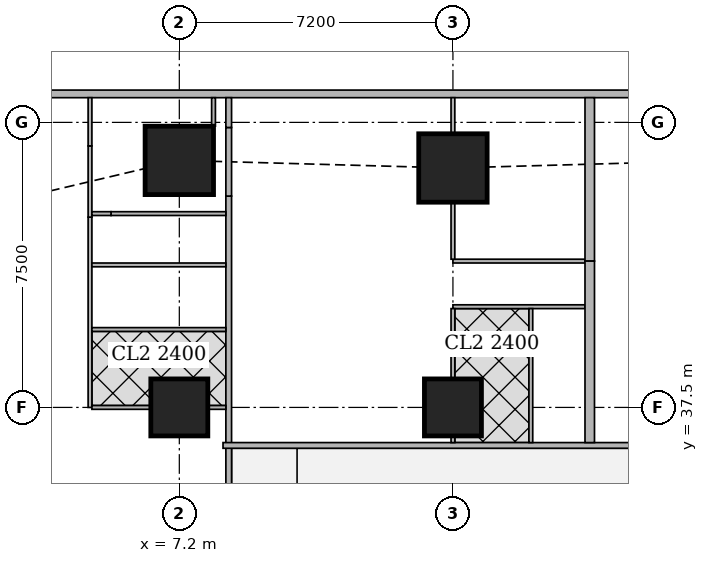
"""IFC4 building model, lengths in metres.
Left out: names, types, materials, properties, quantities, classifications, styles, units other than length and angle.
Written with IfcOpenShell. Run it as: python <this file> out.ifc"""

import sys

from ifc_helpers import new_model, si_unit, direction, frame, frame_2d, origin, origin_2d, place, context, subcontext, project, spatial, rectangle, extrude, element, fill, save


model = new_model("IFC4")
c1 = context("Model", 3, precision=1e-05, world=origin(), true_north=direction((0.0, 1.0)))
c2 = subcontext(c1, "Body", "Model", "MODEL_VIEW")
j1 = project(units=[si_unit("LENGTHUNIT", "METRE"), si_unit("PLANEANGLEUNIT", "RADIAN")], contexts=[c1])
p1 = place(None, origin())
s1 = spatial("IfcSite", under=j1, at=p1, CompositionType="ELEMENT")
p2 = place(p1, origin())
s2 = spatial("IfcBuilding", under=s1, at=p2, CompositionType="ELEMENT")
p3 = place(p2, frame((0.0, 0.0, 139.55)))
s3 = spatial("IfcBuildingStorey", under=s2, at=p3, CompositionType="ELEMENT", Elevation=139.55)
for number, where, z_axis, x_axis in (
    (1, (7.2, 37.5, 0.0), (0.0, 0.0, 1.0), (1.0, 0.0, 0.0)),
    (2, (14.4, 37.5, 0.0), (0.0, 0.0, 1.0), (1.0, 0.0, 0.0)),
):
    element("IfcColumn", number, at=place(p3, frame(where, z_axis=z_axis, x_axis=x_axis)), inside=s3, PredefinedType="COLUMN", context=c2, shape_type="SweptSolid", body=[
        extrude(rectangle(XDim=1.5, YDim=1.5, at=origin_2d()), origin(), (0.0, 0.0, 1.0), 3.75),
    ])
for number, where, z_axis, x_axis in (
    (3, (7.2, 44.0, 0.0), (0.0, 0.0, 1.0), (1.0, 0.0, 0.0)),
    (4, (14.4, 43.8, 0.0), (0.0, 0.0, 1.0), (1.0, 0.0, 0.0)),
):
    element("IfcColumn", number, at=place(p3, frame(where, z_axis=z_axis, x_axis=x_axis)), inside=s3, PredefinedType="COLUMN", context=c2, shape_type="SweptSolid", body=[
        extrude(rectangle(XDim=1.8, YDim=1.8, at=origin_2d()), origin(), (0.0, 0.0, 1.0), 3.75),
    ])
p4 = place(p3, frame((40.106, 45.75, 0.0), z_axis=(0.0, 0.0, 1.0), x_axis=(-1.0, 0.0, 0.0)))
e5 = element("IfcWall", 5, at=p4, inside=s3, PredefinedType="SOLIDWALL", context=c2, shape_type="SweptSolid", body=[
    extrude(rectangle(XDim=37.943, YDim=0.2, at=frame_2d((18.971, 0.0))), origin(), (0.0, 0.0, 1.0), 3.5),
])
p5 = place(p4, frame((8.606, 0.0, 0.9)))
e6 = element("IfcOpeningElement", 6, at=p5, cuts=e5, PredefinedType="OPENING", context=c2, shape_type="SweptSolid", body=[
    extrude(rectangle(XDim=1.8, YDim=1.5, at=frame_2d((0.9, 0.75))), frame((0.0, 0.11, 0.0), z_axis=(0.0, -1.0, 0.0), x_axis=(1.0, 0.0, 0.0)), (0.0, 0.0, 1.0), 0.22),
])
p6 = place(p4, frame((12.206, 0.0, 0.9)))
e7 = element("IfcOpeningElement", 7, at=p6, cuts=e5, PredefinedType="OPENING", context=c2, shape_type="SweptSolid", body=[
    extrude(rectangle(XDim=1.8, YDim=1.5, at=frame_2d((0.9, 0.75))), frame((0.0, 0.11, 0.0), z_axis=(0.0, -1.0, 0.0), x_axis=(1.0, 0.0, 0.0)), (0.0, 0.0, 1.0), 0.22),
])
p7 = place(p4, frame((15.806, 0.0, 0.9)))
e8 = element("IfcOpeningElement", 8, at=p7, cuts=e5, PredefinedType="OPENING", context=c2, shape_type="SweptSolid", body=[
    extrude(rectangle(XDim=1.8, YDim=1.5, at=frame_2d((0.9, 0.75))), frame((0.0, 0.11, 0.0), z_axis=(0.0, -1.0, 0.0), x_axis=(1.0, 0.0, 0.0)), (0.0, 0.0, 1.0), 0.22),
])
p8 = place(p4, frame((19.406, 0.0, 0.9)))
e9 = element("IfcOpeningElement", 9, at=p8, cuts=e5, PredefinedType="OPENING", context=c2, shape_type="SweptSolid", body=[
    extrude(rectangle(XDim=1.8, YDim=1.5, at=frame_2d((0.9, 0.75))), frame((0.0, 0.11, 0.0), z_axis=(0.0, -1.0, 0.0), x_axis=(1.0, 0.0, 0.0)), (0.0, 0.0, 1.0), 0.22),
])
p9 = place(p4, frame((23.006, 0.0, 0.9)))
e10 = element("IfcOpeningElement", 10, at=p9, cuts=e5, PredefinedType="OPENING", context=c2, shape_type="SweptSolid", body=[
    extrude(rectangle(XDim=1.8, YDim=1.5, at=frame_2d((0.9, 0.75))), frame((0.0, 0.11, 0.0), z_axis=(0.0, -1.0, 0.0), x_axis=(1.0, 0.0, 0.0)), (0.0, 0.0, 1.0), 0.22),
])
p10 = place(p4, frame((26.606, 0.0, 0.9)))
e11 = element("IfcOpeningElement", 11, at=p10, cuts=e5, PredefinedType="OPENING", context=c2, shape_type="SweptSolid", body=[
    extrude(rectangle(XDim=1.8, YDim=1.5, at=frame_2d((0.9, 0.75))), frame((0.0, 0.11, 0.0), z_axis=(0.0, -1.0, 0.0), x_axis=(1.0, 0.0, 0.0)), (0.0, 0.0, 1.0), 0.22),
])
p11 = place(p3, frame((8.5, 1.964, 0.0), z_axis=(0.0, 0.0, 1.0), x_axis=(0.0, 1.0, 0.0)))
e12 = element("IfcWall", 12, at=p11, inside=s3, PredefinedType="SOLIDWALL", context=c2, shape_type="SweptSolid", body=[
    extrude(rectangle(XDim=41.097, YDim=0.15, at=frame_2d((20.548, 0.0))), origin(), (0.0, 0.0, 1.0), 3.5),
])
p12 = place(p11, frame((6.911, 0.0, 0.0)))
e13 = element("IfcOpeningElement", 13, at=p12, cuts=e12, PredefinedType="OPENING", context=c2, shape_type="SweptSolid", body=[
    extrude(rectangle(XDim=1.0, YDim=2.1, at=frame_2d((0.5, 1.05))), frame((0.0, 0.085, 0.0), z_axis=(0.0, -1.0, 0.0), x_axis=(1.0, 0.0, 0.0)), (0.0, 0.0, 1.0), 0.17),
])
p13 = place(p11, frame((10.661, 0.0, 0.0)))
e14 = element("IfcOpeningElement", 14, at=p13, cuts=e12, PredefinedType="OPENING", context=c2, shape_type="SweptSolid", body=[
    extrude(rectangle(XDim=1.0, YDim=2.1, at=frame_2d((0.5, 1.05))), frame((0.0, 0.085, 0.0), z_axis=(0.0, -1.0, 0.0), x_axis=(1.0, 0.0, 0.0)), (0.0, 0.0, 1.0), 0.17),
])
p14 = place(p11, frame((25.661, 0.0, 0.0)))
e15 = element("IfcOpeningElement", 15, at=p14, cuts=e12, PredefinedType="OPENING", context=c2, shape_type="SweptSolid", body=[
    extrude(rectangle(XDim=1.0, YDim=2.1, at=frame_2d((0.5, 1.05))), frame((0.0, 0.085, 0.0), z_axis=(0.0, -1.0, 0.0), x_axis=(1.0, 0.0, 0.0)), (0.0, 0.0, 1.0), 0.17),
])
p15 = place(p11, frame((33.161, 0.0, 0.0)))
e16 = element("IfcOpeningElement", 16, at=p15, cuts=e12, PredefinedType="OPENING", context=c2, shape_type="SweptSolid", body=[
    extrude(rectangle(XDim=1.0, YDim=2.1, at=frame_2d((0.5, 1.05))), frame((0.0, 0.085, 0.0), z_axis=(0.0, -1.0, 0.0), x_axis=(1.0, 0.0, 0.0)), (0.0, 0.0, 1.0), 0.17),
])
p16 = place(p3, frame((8.5, 43.061, 0.0), z_axis=(0.0, 0.0, 1.0), x_axis=(0.0, 1.0, 0.0)))
e17 = element("IfcWall", 17, at=p16, inside=s3, PredefinedType="SOLIDWALL", context=c2, shape_type="SweptSolid", body=[
    extrude(rectangle(XDim=1.805, YDim=0.15, at=frame_2d((0.902, 0.0))), origin(), (0.0, 0.0, 1.0), 2.1),
])
p17 = place(p3, frame((8.5, 44.866, 0.0), z_axis=(0.0, 0.0, 1.0), x_axis=(0.0, 1.0, 0.0)))
e18 = element("IfcWall", 18, at=p17, inside=s3, PredefinedType="SOLIDWALL", context=c2, shape_type="SweptSolid", body=[
    extrude(rectangle(XDim=0.784, YDim=0.15, at=frame_2d((0.392, 0.0))), origin(), (0.0, 0.0, 1.0), 3.5),
])
p18 = place(p3, frame((8.35, 36.5, 0.0), z_axis=(0.0, 0.0, 1.0), x_axis=(1.0, 0.0, 0.0)))
e19 = element("IfcWall", 19, at=p18, inside=s3, PredefinedType="SOLIDWALL", context=c2, shape_type="SweptSolid", body=[
    extrude(rectangle(XDim=26.415, YDim=0.15, at=frame_2d((13.208, 0.0))), origin(), (0.0, 0.0, 1.0), 3.5),
])
p19 = place(p18, frame((2.6, 0.0, 0.0)))
e20 = element("IfcOpeningElement", 20, at=p19, cuts=e19, PredefinedType="OPENING", context=c2, shape_type="SweptSolid", body=[
    extrude(rectangle(XDim=1.0, YDim=2.1, at=frame_2d((0.5, 1.05))), frame((0.0, 0.085, 0.0), z_axis=(0.0, -1.0, 0.0), x_axis=(1.0, 0.0, 0.0)), (0.0, 0.0, 1.0), 0.17),
])
p20 = place(p18, frame((10.75, 0.0, 0.0)))
e21 = element("IfcOpeningElement", 21, at=p20, cuts=e19, PredefinedType="OPENING", context=c2, shape_type="SweptSolid", body=[
    extrude(rectangle(XDim=1.0, YDim=2.1, at=frame_2d((0.5, 1.05))), frame((0.0, 0.085, 0.0), z_axis=(0.0, -1.0, 0.0), x_axis=(1.0, 0.0, 0.0)), (0.0, 0.0, 1.0), 0.17),
])
p21 = place(p3, frame((8.1, 45.65, 0.0), z_axis=(0.0, 0.0, 1.0), x_axis=(0.0, -1.0, 0.0)))
e22 = element("IfcWall", 22, at=p21, inside=s3, PredefinedType="PARTITIONING", context=c2, shape_type="SweptSolid", body=[
    extrude(rectangle(XDim=0.749, YDim=0.1, at=frame_2d((0.375, 0.0))), origin(), (0.0, 0.0, 1.0), 3.5),
])
p22 = place(p3, frame((4.85, 37.5, 0.0), z_axis=(0.0, 0.0, 1.0), x_axis=(0.0, 1.0, 0.0)))
e23 = element("IfcWall", 23, at=p22, inside=s3, PredefinedType="PARTITIONING", context=c2, shape_type="SweptSolid", body=[
    extrude(rectangle(XDim=5.007, YDim=0.1, at=frame_2d((2.503, 0.0))), origin(), (0.0, 0.0, 1.0), 3.5),
])
p23 = place(p22, frame((0.575, 0.0, 0.0)))
e24 = element("IfcOpeningElement", 24, at=p23, cuts=e23, PredefinedType="OPENING", context=c2, shape_type="SweptSolid", body=[
    extrude(rectangle(XDim=0.9, YDim=2.1, at=frame_2d((0.45, 1.05))), frame((0.0, 0.06, 0.0), z_axis=(0.0, -1.0, 0.0), x_axis=(1.0, 0.0, 0.0)), (0.0, 0.0, 1.0), 0.12),
])
p24 = place(p22, frame((2.45, 0.0, 0.0)))
e25 = element("IfcOpeningElement", 25, at=p24, cuts=e23, PredefinedType="OPENING", context=c2, shape_type="SweptSolid", body=[
    extrude(rectangle(XDim=0.9, YDim=2.1, at=frame_2d((0.45, 1.05))), frame((0.0, 0.06, 0.0), z_axis=(0.0, -1.0, 0.0), x_axis=(1.0, 0.0, 0.0)), (0.0, 0.0, 1.0), 0.12),
])
p25 = place(p3, frame((4.85, 42.507, 0.0), z_axis=(0.0, 0.0, 1.0), x_axis=(0.0, 1.0, 0.0)))
e26 = element("IfcWall", 26, at=p25, inside=s3, PredefinedType="PARTITIONING", context=c2, shape_type="SweptSolid", body=[
    extrude(rectangle(XDim=1.874, YDim=0.1, at=frame_2d((0.937, 0.0))), origin(), (0.0, 0.0, 1.0), 2.1),
])
p26 = place(p3, frame((4.85, 44.381, 0.0), z_axis=(0.0, 0.0, 1.0), x_axis=(0.0, 1.0, 0.0)))
e27 = element("IfcWall", 27, at=p26, inside=s3, PredefinedType="PARTITIONING", context=c2, shape_type="SweptSolid", body=[
    extrude(rectangle(XDim=1.269, YDim=0.1, at=frame_2d((0.634, 0.0))), origin(), (0.0, 0.0, 1.0), 3.5),
])
p27 = place(p26, frame((0.15, 0.0, 0.0)))
e28 = element("IfcOpeningElement", 28, at=p27, cuts=e27, PredefinedType="OPENING", context=c2, shape_type="SweptSolid", body=[
    extrude(rectangle(XDim=0.9, YDim=2.1, at=frame_2d((0.45, 1.05))), frame((0.0, 0.06, 0.0), z_axis=(0.0, -1.0, 0.0), x_axis=(1.0, 0.0, 0.0)), (0.0, 0.0, 1.0), 0.12),
])
p28 = place(p3, frame((4.9, 37.5, 0.0), z_axis=(0.0, 0.0, 1.0), x_axis=(1.0, 0.0, 0.0)))
e29 = element("IfcWall", 29, at=p28, inside=s3, PredefinedType="PARTITIONING", context=c2, shape_type="SweptSolid", body=[
    extrude(rectangle(XDim=1.549, YDim=0.1, at=frame_2d((0.774, 0.0))), origin(), (0.0, 0.0, 1.0), 3.5),
])
p29 = place(p3, frame((7.951, 37.5, 0.0), z_axis=(0.0, 0.0, 1.0), x_axis=(1.0, 0.0, 0.0)))
e30 = element("IfcWall", 30, at=p29, inside=s3, PredefinedType="PARTITIONING", context=c2, shape_type="SweptSolid", body=[
    extrude(rectangle(XDim=0.474, YDim=0.1, at=frame_2d((0.237, 0.0))), origin(), (0.0, 0.0, 1.0), 3.5),
])
for number, where, z_axis, x_axis in (
    (31, (4.9, 41.25, 0.0), (0.0, 0.0, 1.0), (1.0, 0.0, 0.0)),
    (32, (4.9, 39.55, 0.0), (0.0, 0.0, 1.0), (1.0, 0.0, 0.0)),
):
    element("IfcWall", number, at=place(p3, frame(where, z_axis=z_axis, x_axis=x_axis)), inside=s3, PredefinedType="PARTITIONING", context=c2, shape_type="SweptSolid", body=[
        extrude(rectangle(XDim=3.525, YDim=0.1, at=frame_2d((1.763, 0.0))), origin(), (0.0, 0.0, 1.0), 3.5),
    ])
p30 = place(p3, frame((14.4, 41.35, 0.0), z_axis=(0.0, 0.0, 1.0), x_axis=(1.0, 0.0, 0.0)))
e33 = element("IfcWall", 33, at=p30, inside=s3, PredefinedType="PARTITIONING", context=c2, shape_type="SweptSolid", body=[
    extrude(rectangle(XDim=3.475, YDim=0.1, at=frame_2d((1.738, 0.0))), origin(), (0.0, 0.0, 1.0), 3.5),
])
p31 = place(p30, frame((0.2, 0.0, 0.0)))
e34 = element("IfcOpeningElement", 34, at=p31, cuts=e33, PredefinedType="OPENING", context=c2, shape_type="SweptSolid", body=[
    extrude(rectangle(XDim=0.9, YDim=2.1, at=frame_2d((0.45, 1.05))), frame((0.0, 0.06, 0.0), z_axis=(0.0, -1.0, 0.0), x_axis=(1.0, 0.0, 0.0)), (0.0, 0.0, 1.0), 0.12),
])
p32 = place(p3, frame((14.4, 40.15, 0.0), z_axis=(0.0, 0.0, 1.0), x_axis=(1.0, 0.0, 0.0)))
e35 = element("IfcWall", 35, at=p32, inside=s3, PredefinedType="PARTITIONING", context=c2, shape_type="SweptSolid", body=[
    extrude(rectangle(XDim=3.475, YDim=0.1, at=frame_2d((1.738, 0.0))), origin(), (0.0, 0.0, 1.0), 3.5),
])
p33 = place(p32, frame((0.575, 0.0, 0.0)))
e36 = element("IfcOpeningElement", 36, at=p33, cuts=e35, PredefinedType="OPENING", context=c2, shape_type="SweptSolid", body=[
    extrude(rectangle(XDim=0.9, YDim=2.1, at=frame_2d((0.45, 1.05))), frame((0.0, 0.06, 0.0), z_axis=(0.0, -1.0, 0.0), x_axis=(1.0, 0.0, 0.0)), (0.0, 0.0, 1.0), 0.12),
])
p34 = place(p32, frame((2.375, 0.0, 0.0)))
e37 = element("IfcOpeningElement", 37, at=p34, cuts=e35, PredefinedType="OPENING", context=c2, shape_type="SweptSolid", body=[
    extrude(rectangle(XDim=0.9, YDim=2.1, at=frame_2d((0.45, 1.05))), frame((0.0, 0.06, 0.0), z_axis=(0.0, -1.0, 0.0), x_axis=(1.0, 0.0, 0.0)), (0.0, 0.0, 1.0), 0.12),
])
p35 = place(p3, frame((14.4, 41.4, 0.0), z_axis=(0.0, 0.0, 1.0), x_axis=(0.0, 1.0, 0.0)))
e38 = element("IfcWall", 38, at=p35, inside=s3, PredefinedType="PARTITIONING", context=c2, shape_type="SweptSolid", body=[
    extrude(rectangle(XDim=1.499, YDim=0.1, at=frame_2d((0.75, 0.0))), origin(), (0.0, 0.0, 1.0), 3.5),
])
p36 = place(p3, frame((14.4, 44.701, 0.0), z_axis=(0.0, 0.0, 1.0), x_axis=(0.0, 1.0, 0.0)))
e39 = element("IfcWall", 39, at=p36, inside=s3, PredefinedType="PARTITIONING", context=c2, shape_type="SweptSolid", body=[
    extrude(rectangle(XDim=0.949, YDim=0.1, at=frame_2d((0.475, 0.0))), origin(), (0.0, 0.0, 1.0), 3.5),
])
p37 = place(p3, frame((14.4, 36.575, 0.0), z_axis=(0.0, 0.0, 1.0), x_axis=(0.0, 1.0, 0.0)))
e40 = element("IfcWall", 40, at=p37, inside=s3, PredefinedType="PARTITIONING", context=c2, shape_type="SweptSolid", body=[
    extrude(rectangle(XDim=0.174, YDim=0.1, at=frame_2d((0.087, 0.0))), origin(), (0.0, 0.0, 1.0), 3.5),
])
p38 = place(p3, frame((14.4, 38.251, 0.0), z_axis=(0.0, 0.0, 1.0), x_axis=(0.0, 1.0, 0.0)))
e41 = element("IfcWall", 41, at=p38, inside=s3, PredefinedType="PARTITIONING", context=c2, shape_type="SweptSolid", body=[
    extrude(rectangle(XDim=1.849, YDim=0.1, at=frame_2d((0.925, 0.0))), origin(), (0.0, 0.0, 1.0), 3.5),
])
p39 = place(p3, frame((16.45, 36.575, 0.0), z_axis=(0.0, 0.0, 1.0), x_axis=(0.0, 1.0, 0.0)))
e42 = element("IfcWall", 42, at=p39, inside=s3, PredefinedType="PARTITIONING", context=c2, shape_type="SweptSolid", body=[
    extrude(rectangle(XDim=3.525, YDim=0.1, at=frame_2d((1.763, 0.0))), origin(), (0.0, 0.0, 1.0), 3.5),
])
p40 = place(p3, frame((18.0, 41.35, 0.0), z_axis=(0.0, 0.0, 1.0), x_axis=(0.0, 1.0, 0.0)))
e43 = element("IfcWall", 43, at=p40, inside=s3, PredefinedType="SOLIDWALL", context=c2, shape_type="SweptSolid", body=[
    extrude(rectangle(XDim=4.3, YDim=0.25, at=frame_2d((2.15, 0.0))), origin(), (0.0, 0.0, 1.0), 2.1),
])
p41 = place(p3, frame((18.0, 36.575, 0.0), z_axis=(0.0, 0.0, 1.0), x_axis=(0.0, 1.0, 0.0)))
e44 = element("IfcWall", 44, at=p41, inside=s3, PredefinedType="SOLIDWALL", context=c2, shape_type="SweptSolid", body=[
    extrude(rectangle(XDim=4.775, YDim=0.25, at=frame_2d((2.388, 0.0))), origin(), (0.0, 0.0, 1.0), 3.5),
])
p42 = place(p3, frame((8.425, 42.6, 0.0), z_axis=(0.0, 0.0, 1.0), x_axis=(-1.0, 0.0, 0.0)))
e45 = element("IfcWall", 45, at=p42, inside=s3, PredefinedType="PARTITIONING", context=c2, shape_type="SweptSolid", body=[
    extrude(rectangle(XDim=3.022, YDim=0.1, at=frame_2d((1.511, 0.0))), origin(), (0.0, 0.0, 1.0), 3.5),
])
p43 = place(p42, frame((1.95, 0.0, 0.0)))
e46 = element("IfcOpeningElement", 46, at=p43, cuts=e45, PredefinedType="OPENING", context=c2, shape_type="SweptSolid", body=[
    extrude(rectangle(XDim=0.9, YDim=2.1, at=frame_2d((0.45, 1.05))), frame((0.0, 0.06, 0.0), z_axis=(0.0, -1.0, 0.0), x_axis=(1.0, 0.0, 0.0)), (0.0, 0.0, 1.0), 0.12),
])
p44 = place(p3, frame((5.403, 42.6, 0.0), z_axis=(0.0, 0.0, 1.0), x_axis=(-1.0, 0.0, 0.0)))
e47 = element("IfcWall", 47, at=p44, inside=s3, PredefinedType="PARTITIONING", context=c2, shape_type="SweptSolid", body=[
    extrude(rectangle(XDim=0.503, YDim=0.1, at=frame_2d((0.251, 0.0))), origin(), (0.0, 0.0, 1.0), 2.1),
])
p45 = place(p8, origin())
e48 = element("IfcWindow", 48, at=p45, inside=s3, PartitioningType="SINGLE_PANEL", PredefinedType="WINDOW", context=c2, shape_type="SweptSolid", body=[
    extrude(rectangle(XDim=1.8, YDim=1.5, at=frame_2d((0.9, 0.75))), frame((0.0, 0.03, 0.0), z_axis=(0.0, -1.0, 0.0), x_axis=(1.0, 0.0, 0.0)), (0.0, 0.0, 1.0), 0.06),
])
fill(e9, e48)
p46 = place(p9, origin())
e49 = element("IfcWindow", 49, at=p46, inside=s3, PartitioningType="SINGLE_PANEL", PredefinedType="WINDOW", context=c2, shape_type="SweptSolid", body=[
    extrude(rectangle(XDim=1.8, YDim=1.5, at=frame_2d((0.9, 0.75))), frame((0.0, 0.03, 0.0), z_axis=(0.0, -1.0, 0.0), x_axis=(1.0, 0.0, 0.0)), (0.0, 0.0, 1.0), 0.06),
])
fill(e10, e49)
p47 = place(p10, origin())
e50 = element("IfcWindow", 50, at=p47, inside=s3, PartitioningType="SINGLE_PANEL", PredefinedType="WINDOW", context=c2, shape_type="SweptSolid", body=[
    extrude(rectangle(XDim=1.8, YDim=1.5, at=frame_2d((0.9, 0.75))), frame((0.0, 0.03, 0.0), z_axis=(0.0, -1.0, 0.0), x_axis=(1.0, 0.0, 0.0)), (0.0, 0.0, 1.0), 0.06),
])
fill(e11, e50)
p48 = place(p23, origin())
e51 = element("IfcDoor", 51, at=p48, inside=s3, OperationType="SINGLE_SWING_RIGHT", PredefinedType="DOOR", context=c2, shape_type="SweptSolid", body=[
    extrude(rectangle(XDim=0.9, YDim=2.1, at=frame_2d((0.45, 1.05))), frame((0.0, 0.025, 0.0), z_axis=(0.0, -1.0, 0.0), x_axis=(1.0, 0.0, 0.0)), (0.0, 0.0, 1.0), 0.05),
])
fill(e24, e51)
p49 = place(p27, origin())
e52 = element("IfcDoor", 52, at=p49, inside=s3, OperationType="SINGLE_SWING_RIGHT", PredefinedType="DOOR", context=c2, shape_type="SweptSolid", body=[
    extrude(rectangle(XDim=0.9, YDim=2.1, at=frame_2d((0.45, 1.05))), frame((0.0, 0.025, 0.0), z_axis=(0.0, -1.0, 0.0), x_axis=(1.0, 0.0, 0.0)), (0.0, 0.0, 1.0), 0.05),
])
fill(e28, e52)
p50 = place(p24, origin())
e53 = element("IfcDoor", 53, at=p50, inside=s3, OperationType="SINGLE_SWING_LEFT", PredefinedType="DOOR", context=c2, shape_type="SweptSolid", body=[
    extrude(rectangle(XDim=0.9, YDim=2.1, at=frame_2d((0.45, 1.05))), frame((0.0, 0.025, 0.0), z_axis=(0.0, -1.0, 0.0), x_axis=(1.0, 0.0, 0.0)), (0.0, 0.0, 1.0), 0.05),
])
fill(e25, e53)
p51 = place(p15, origin())
e54 = element("IfcDoor", 54, at=p51, inside=s3, OperationType="SINGLE_SWING_RIGHT", PredefinedType="DOOR", context=c2, shape_type="SweptSolid", body=[
    extrude(rectangle(XDim=1.0, YDim=2.1, at=frame_2d((0.5, 1.05))), frame((0.0, 0.025, 0.0), z_axis=(0.0, -1.0, 0.0), x_axis=(1.0, 0.0, 0.0)), (0.0, 0.0, 1.0), 0.05),
])
fill(e16, e54)
p52 = place(p31, origin())
e55 = element("IfcDoor", 55, at=p52, inside=s3, OperationType="SINGLE_SWING_LEFT", PredefinedType="DOOR", context=c2, shape_type="SweptSolid", body=[
    extrude(rectangle(XDim=0.9, YDim=2.1, at=frame_2d((0.45, 1.05))), frame((0.0, 0.025, 0.0), z_axis=(0.0, -1.0, 0.0), x_axis=(1.0, 0.0, 0.0)), (0.0, 0.0, 1.0), 0.05),
])
fill(e34, e55)
p53 = place(p33, origin())
e56 = element("IfcDoor", 56, at=p53, inside=s3, OperationType="SINGLE_SWING_RIGHT", PredefinedType="DOOR", context=c2, shape_type="SweptSolid", body=[
    extrude(rectangle(XDim=0.9, YDim=2.1, at=frame_2d((0.45, 1.05))), frame((0.0, 0.025, 0.0), z_axis=(0.0, -1.0, 0.0), x_axis=(1.0, 0.0, 0.0)), (0.0, 0.0, 1.0), 0.05),
])
fill(e36, e56)
p54 = place(p34, origin())
e57 = element("IfcDoor", 57, at=p54, inside=s3, OperationType="SINGLE_SWING_LEFT", PredefinedType="DOOR", context=c2, shape_type="SweptSolid", body=[
    extrude(rectangle(XDim=0.9, YDim=2.1, at=frame_2d((0.45, 1.05))), frame((0.0, 0.025, 0.0), z_axis=(0.0, -1.0, 0.0), x_axis=(1.0, 0.0, 0.0)), (0.0, 0.0, 1.0), 0.05),
])
fill(e37, e57)
p55 = place(p19, origin())
e58 = element("IfcDoor", 58, at=p55, inside=s3, OperationType="SINGLE_SWING_LEFT", PredefinedType="DOOR", context=c2, shape_type="SweptSolid", body=[
    extrude(rectangle(XDim=1.0, YDim=2.1, at=frame_2d((0.5, 1.05))), frame((0.0, 0.025, 0.0), z_axis=(0.0, -1.0, 0.0), x_axis=(1.0, 0.0, 0.0)), (0.0, 0.0, 1.0), 0.05),
])
fill(e20, e58)
p56 = place(p43, origin())
e59 = element("IfcDoor", 59, at=p56, inside=s3, OperationType="SINGLE_SWING_RIGHT", PredefinedType="DOOR", context=c2, shape_type="SweptSolid", body=[
    extrude(rectangle(XDim=0.9, YDim=2.1, at=frame_2d((0.45, 1.05))), frame((0.0, 0.025, 0.0), z_axis=(0.0, -1.0, 0.0), x_axis=(1.0, 0.0, 0.0)), (0.0, 0.0, 1.0), 0.05),
])
fill(e46, e59)
save(model, sys.argv[1])
